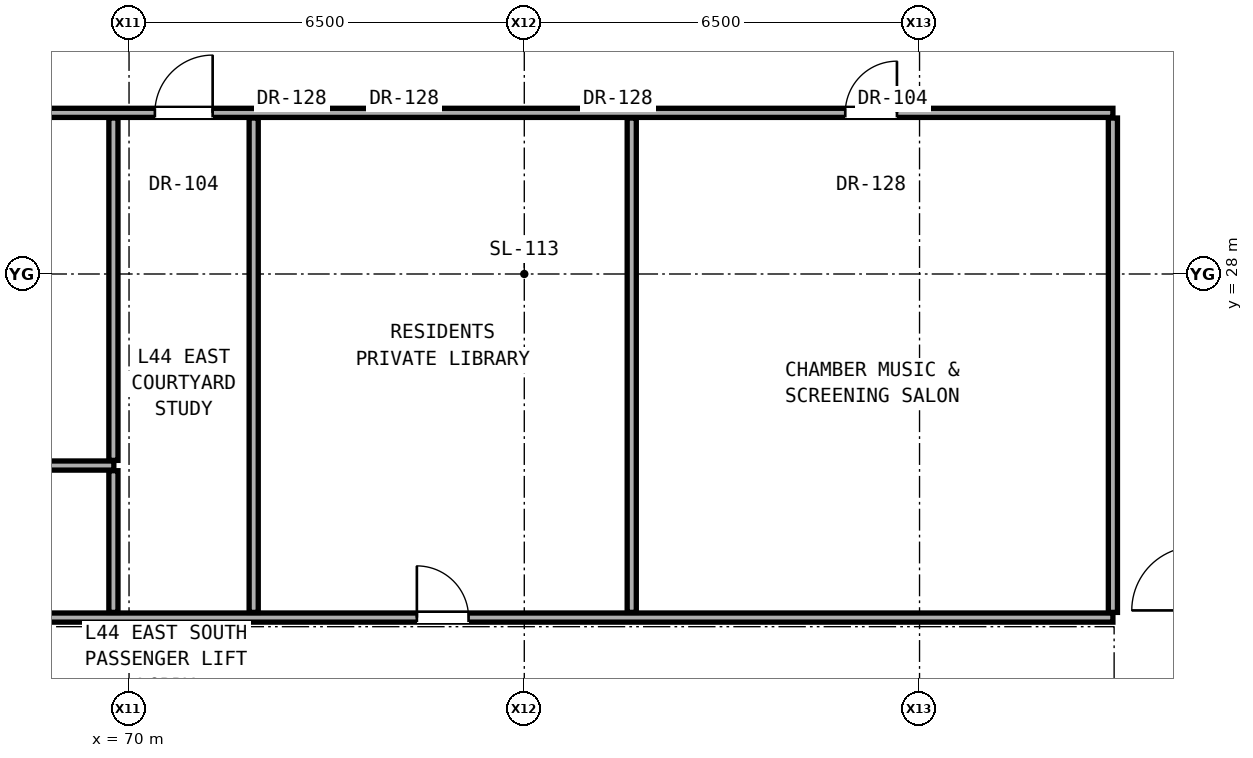
"""IFC4 building model, lengths in metres.
Left out: names, types, materials, properties, quantities, classifications, styles, units other than length and angle.
Written with IfcOpenShell. Run it as: python <this file> out.ifc"""

import sys

from ifc_helpers import new_model, si_unit, direction, frame, frame_2d, origin, place, context, subcontext, project, spatial, rectangle, extrude, element, fill, save


model = new_model("IFC4")
c1 = context("Model", 3, precision=1e-05, world=origin(), true_north=direction((0.0, 1.0)))
c2 = subcontext(c1, "Body", "Model", "MODEL_VIEW")
j1 = project(units=[si_unit("LENGTHUNIT", "METRE"), si_unit("PLANEANGLEUNIT", "RADIAN")], contexts=[c1])
p1 = place(None, origin())
s1 = spatial("IfcSite", under=j1, at=p1, CompositionType="ELEMENT")
p2 = place(p1, origin())
s2 = spatial("IfcBuilding", under=s1, at=p2, CompositionType="ELEMENT")
p3 = place(p2, frame((0.0, 0.0, 157.65)))
s3 = spatial("IfcBuildingStorey", under=s2, at=p3, CompositionType="ELEMENT", Elevation=157.65)
p4 = place(p3, frame((66.68, 22.35, 0.0), z_axis=(0.0, 0.0, 1.0), x_axis=(1.0, 0.0, 0.0)))
e1 = element("IfcWall", 1, at=p4, inside=s3, PredefinedType="PARTITIONING", context=c2, shape_type="SweptSolid", body=[
    extrude(rectangle(XDim=19.5, YDim=0.15, at=frame_2d((9.75, 0.0))), origin(), (0.0, 0.0, 1.0), 2.186),
])
p5 = place(p4, frame((8.053, 0.0, 0.0)))
e2 = element("IfcOpeningElement", 2, at=p5, cuts=e1, PredefinedType="OPENING", context=c2, shape_type="SweptSolid", body=[
    extrude(rectangle(XDim=0.85, YDim=2.01, at=frame_2d((0.425, 1.005))), frame((0.0, 0.085, 0.0), z_axis=(0.0, -1.0, 0.0), x_axis=(1.0, 0.0, 0.0)), (0.0, 0.0, 1.0), 0.17),
])
p6 = place(p3, frame((66.68, 24.85, 0.0), z_axis=(0.0, 0.0, 1.0), x_axis=(1.0, 0.0, 0.0)))
e3 = element("IfcWall", 3, at=p6, inside=s3, PredefinedType="PARTITIONING", context=c2, shape_type="SweptSolid", body=[
    extrude(rectangle(XDim=3.07, YDim=0.15, at=frame_2d((1.535, 0.0))), origin(), (0.0, 0.0, 1.0), 2.186),
])
p7 = place(p3, frame((66.68, 30.65, 0.0), z_axis=(0.0, 0.0, 1.0), x_axis=(1.0, 0.0, 0.0)))
e4 = element("IfcWall", 4, at=p7, inside=s3, PredefinedType="PARTITIONING", context=c2, shape_type="SweptSolid", body=[
    extrude(rectangle(XDim=19.5, YDim=0.15, at=frame_2d((9.75, 0.0))), origin(), (0.0, 0.0, 1.0), 2.186),
])
p8 = place(p7, frame((3.745, 0.0, 0.0)))
e5 = element("IfcOpeningElement", 5, at=p8, cuts=e4, PredefinedType="OPENING", context=c2, shape_type="SweptSolid", body=[
    extrude(rectangle(XDim=0.95, YDim=2.15, at=frame_2d((0.475, 1.075))), frame((0.0, 0.085, 0.0), z_axis=(0.0, -1.0, 0.0), x_axis=(1.0, 0.0, 0.0)), (0.0, 0.0, 1.0), 0.17),
])
p9 = place(p7, frame((15.098, 0.0, 0.0)))
e6 = element("IfcOpeningElement", 6, at=p9, cuts=e4, PredefinedType="OPENING", context=c2, shape_type="SweptSolid", body=[
    extrude(rectangle(XDim=0.85, YDim=2.01, at=frame_2d((0.425, 1.005))), frame((0.0, 0.085, 0.0), z_axis=(0.0, -1.0, 0.0), x_axis=(1.0, 0.0, 0.0)), (0.0, 0.0, 1.0), 0.17),
])
p10 = place(p3, frame((69.743, 22.435, 0.0), z_axis=(0.0, 0.0, 1.0), x_axis=(0.0, 1.0, 0.0)))
e7 = element("IfcWall", 7, at=p10, inside=s3, PredefinedType="PARTITIONING", context=c2, shape_type="SweptSolid", body=[
    extrude(rectangle(XDim=2.33, YDim=0.15, at=frame_2d((1.165, 0.0))), origin(), (0.0, 0.0, 1.0), 3.05),
])
p11 = place(p3, frame((69.743, 24.935, 0.0), z_axis=(0.0, 0.0, 1.0), x_axis=(0.0, 1.0, 0.0)))
e8 = element("IfcWall", 8, at=p11, inside=s3, PredefinedType="PARTITIONING", context=c2, shape_type="SweptSolid", body=[
    extrude(rectangle(XDim=5.63, YDim=0.15, at=frame_2d((2.815, 0.0))), origin(), (0.0, 0.0, 1.0), 2.186),
])
for number, where, z_axis, x_axis in (
    (9, (72.05, 22.435, 0.0), (0.0, 0.0, 1.0), (0.0, 1.0, 0.0)),
    (10, (78.267, 22.435, 0.0), (0.0, 0.0, 1.0), (0.0, 1.0, 0.0)),
):
    element("IfcWall", number, at=place(p3, frame(where, z_axis=z_axis, x_axis=x_axis)), inside=s3, PredefinedType="PARTITIONING", context=c2, shape_type="SweptSolid", body=[
        extrude(rectangle(XDim=8.13, YDim=0.15, at=frame_2d((4.065, 0.0))), origin(), (0.0, 0.0, 1.0), 2.186),
    ])
p12 = place(p3, frame((86.18, 22.435, 0.0), z_axis=(0.0, 0.0, 1.0), x_axis=(0.0, 1.0, 0.0)))
e11 = element("IfcWall", 11, at=p12, inside=s3, PredefinedType="PARTITIONING", context=c2, shape_type="SweptSolid", body=[
    extrude(rectangle(XDim=8.13, YDim=0.15, at=frame_2d((4.065, 0.0))), origin(), (0.0, 0.0, 1.0), 2.346),
])
p13 = place(p8, origin())
e12 = element("IfcDoor", 12, at=p13, inside=s3, OperationType="SINGLE_SWING_RIGHT", PredefinedType="DOOR", context=c2, shape_type="SweptSolid", body=[
    extrude(rectangle(XDim=0.95, YDim=2.15, at=frame_2d((0.475, 1.075))), frame((0.0, 0.025, 0.0), z_axis=(0.0, -1.0, 0.0), x_axis=(1.0, 0.0, 0.0)), (0.0, 0.0, 1.0), 0.05),
])
fill(e5, e12)
p14 = place(p5, origin())
e13 = element("IfcDoor", 13, at=p14, inside=s3, OperationType="SINGLE_SWING_LEFT", PredefinedType="DOOR", context=c2, shape_type="SweptSolid", body=[
    extrude(rectangle(XDim=0.85, YDim=2.01, at=frame_2d((0.425, 1.005))), frame((0.0, 0.025, 0.0), z_axis=(0.0, -1.0, 0.0), x_axis=(1.0, 0.0, 0.0)), (0.0, 0.0, 1.0), 0.05),
])
fill(e2, e13)
p15 = place(p9, origin())
e14 = element("IfcDoor", 14, at=p15, inside=s3, OperationType="SINGLE_SWING_RIGHT", PredefinedType="DOOR", context=c2, shape_type="SweptSolid", body=[
    extrude(rectangle(XDim=0.85, YDim=2.01, at=frame_2d((0.425, 1.005))), frame((0.0, 0.025, 0.0), z_axis=(0.0, -1.0, 0.0), x_axis=(1.0, 0.0, 0.0)), (0.0, 0.0, 1.0), 0.05),
])
fill(e6, e14)
save(model, sys.argv[1])
